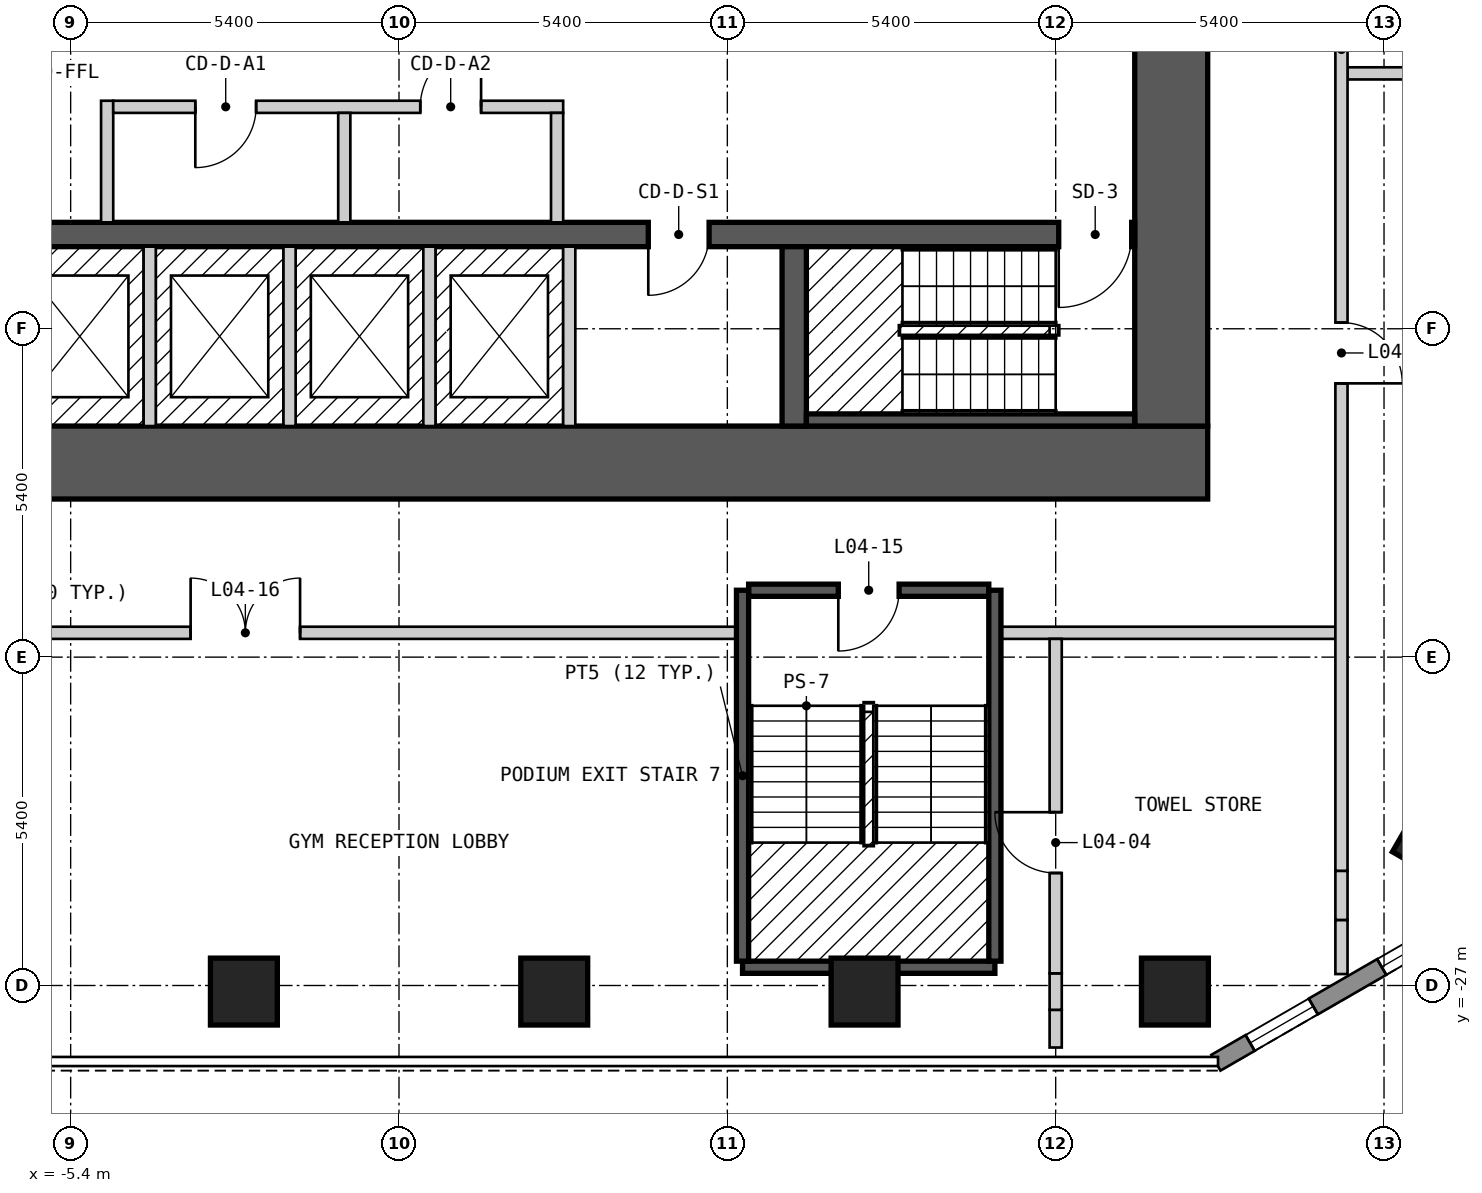
"""IFC4 building model, lengths in metres.
Left out: names, types, materials, properties, quantities, classifications, styles, units other than length and angle.
Written with IfcOpenShell. Run it as: python <this file> out.ifc"""

import sys

from ifc_helpers import new_model, si_unit, direction, frame, frame_2d, origin, origin_2d, place, context, subcontext, project, spatial, polyline, rectangle, outline, extrude, element, fill, save


model = new_model("IFC4")
c1 = context("Model", 3, precision=1e-05, world=origin(), true_north=direction((0.0, 1.0)))
c2 = subcontext(c1, "Body", "Model", "MODEL_VIEW")
j1 = project(units=[si_unit("LENGTHUNIT", "METRE"), si_unit("PLANEANGLEUNIT", "RADIAN")], contexts=[c1])
p1 = place(None, origin())
s1 = spatial("IfcSite", under=j1, at=p1, CompositionType="ELEMENT")
p2 = place(p1, origin())
s2 = spatial("IfcBuilding", under=s1, at=p2, CompositionType="ELEMENT")
p3 = place(p2, frame((0.0, 0.0, 16.2)))
s3 = spatial("IfcBuildingStorey", under=s2, at=p3, CompositionType="ELEMENT", Elevation=16.2)
for number, where, z_axis, x_axis in (
    (1, (-2.551, -27.1, 0.0), (0.0, 0.0, 1.0), (1.0, 0.0, 0.0)),
    (2, (2.553, -27.1, 0.0), (0.0, 0.0, 1.0), (1.0, 0.0, 0.0)),
    (3, (7.657, -27.1, 0.0), (0.0, 0.0, 1.0), (1.0, 0.0, 0.0)),
    (4, (12.761, -27.1, 0.0), (0.0, 0.0, 1.0), (1.0, 0.0, 0.0)),
    (5, (17.09, -24.6, 0.0), (0.0, 0.0, 1.0), (0.5, 0.866, 0.0)),
):
    element("IfcColumn", number, at=place(p3, frame(where, z_axis=z_axis, x_axis=x_axis)), inside=s3, PredefinedType="COLUMN", context=c2, shape_type="SweptSolid", body=[
        extrude(rectangle(XDim=1.1, YDim=1.1, at=origin_2d()), origin(), (0.0, 0.0, 1.0), 3.6),
    ])
p4 = place(p3, frame((-13.3, -18.4, 0.0), z_axis=(0.0, 0.0, 1.0), x_axis=(1.0, 0.0, 0.0)))
e6 = element("IfcWall", 6, at=p4, inside=s3, PredefinedType="SHEAR", context=c2, shape_type="SweptSolid", body=[
    extrude(rectangle(XDim=26.6, YDim=1.2, at=frame_2d((13.3, 0.0))), origin(), (0.0, 0.0, 1.0), 3.25),
])
p5 = place(p3, frame((12.7, -17.8, 0.0), z_axis=(0.0, 0.0, 1.0), x_axis=(0.0, 1.0, 0.0)))
e7 = element("IfcWall", 7, at=p5, inside=s3, PredefinedType="SHEAR", context=c2, shape_type="SweptSolid", body=[
    extrude(rectangle(XDim=11.6, YDim=1.2, at=frame_2d((5.8, 0.0))), origin(), (0.0, 0.0, 1.0), 3.25),
])
p6 = place(p3, frame((-12.1, -14.65, 0.0), z_axis=(0.0, 0.0, 1.0), x_axis=(1.0, 0.0, 0.0)))
e8 = element("IfcWall", 8, at=p6, inside=s3, PredefinedType="SHEAR", context=c2, shape_type="SweptSolid", body=[
    extrude(rectangle(XDim=24.2, YDim=0.4, at=frame_2d((12.1, 0.0))), origin(), (0.0, 0.0, 1.0), 3.25),
])
p7 = place(p6, frame((1.3, 0.0, 0.0), z_axis=(0.0, 0.0, 1.0), x_axis=(-1.0, 0.0, 0.0)))
e9 = element("IfcOpeningElement", 9, at=p7, cuts=e8, PredefinedType="OPENING", context=c2, shape_type="SweptSolid", body=[
    extrude(rectangle(XDim=1.2, YDim=2.1, at=frame_2d((0.6, 1.05))), frame((0.0, 0.21, 0.0), z_axis=(0.0, -1.0, 0.0), x_axis=(1.0, 0.0, 0.0)), (0.0, 0.0, 1.0), 0.42),
])
p8 = place(p6, frame((24.15, 0.0, 0.0), z_axis=(0.0, 0.0, 1.0), x_axis=(-1.0, 0.0, 0.0)))
e10 = element("IfcOpeningElement", 10, at=p8, cuts=e8, PredefinedType="OPENING", context=c2, shape_type="SweptSolid", body=[
    extrude(rectangle(XDim=1.2, YDim=2.1, at=frame_2d((0.6, 1.05))), frame((0.0, 0.21, 0.0), z_axis=(0.0, -1.0, 0.0), x_axis=(1.0, 0.0, 0.0)), (0.0, 0.0, 1.0), 0.42),
])
p9 = place(p6, frame((17.2, 0.0, 0.0), z_axis=(0.0, 0.0, 1.0), x_axis=(-1.0, 0.0, 0.0)))
e11 = element("IfcOpeningElement", 11, at=p9, cuts=e8, PredefinedType="OPENING", context=c2, shape_type="SweptSolid", body=[
    extrude(rectangle(XDim=1.0, YDim=2.1, at=frame_2d((0.5, 1.05))), frame((0.0, 0.21, 0.0), z_axis=(0.0, -1.0, 0.0), x_axis=(1.0, 0.0, 0.0)), (0.0, 0.0, 1.0), 0.42),
])
p10 = place(p3, frame((6.5, -17.8, 0.0), z_axis=(0.0, 0.0, 1.0), x_axis=(0.0, 1.0, 0.0)))
e12 = element("IfcWall", 12, at=p10, inside=s3, PredefinedType="SHEAR", context=c2, shape_type="SweptSolid", body=[
    extrude(rectangle(XDim=2.95, YDim=0.4, at=frame_2d((1.475, 0.0))), origin(), (0.0, 0.0, 1.0), 3.25),
])
p11 = place(p3, frame((13.435, -28.27, 0.0), z_axis=(0.0, 0.0, 1.0), x_axis=(0.866010750942, 0.50002537861, 0.0)))
e13 = element("IfcWall", 13, at=p11, inside=s3, PredefinedType="SOLIDWALL", context=c2, shape_type="SweptSolid", body=[
    extrude(outline(polyline([(0.0, -0.15), (5.0, -0.15), (4.919, 0.15), (0.08, 0.15), (0.0, -0.15)])), origin(), (0.0, 0.0, 1.0), 3.25),
])
p12 = place(p11, frame((0.65, 0.0, 0.15)))
e14 = element("IfcOpeningElement", 14, at=p12, cuts=e13, PredefinedType="OPENING", context=c2, shape_type="SweptSolid", body=[
    extrude(rectangle(XDim=1.2, YDim=2.1, at=frame_2d((0.6, 1.05))), frame((0.0, 0.16, 0.0), z_axis=(0.0, -1.0, 0.0), x_axis=(1.0, 0.0, 0.0)), (0.0, 0.0, 1.0), 0.32),
])
p13 = place(p11, frame((3.149, 0.0, 0.15)))
e15 = element("IfcOpeningElement", 15, at=p13, cuts=e13, PredefinedType="OPENING", context=c2, shape_type="SweptSolid", body=[
    extrude(rectangle(XDim=1.2, YDim=2.1, at=frame_2d((0.6, 1.05))), frame((0.0, 0.16, 0.0), z_axis=(0.0, -1.0, 0.0), x_axis=(1.0, 0.0, 0.0)), (0.0, 0.0, 1.0), 0.32),
])
p14 = place(p3, frame((5.65, -26.7, 0.0), z_axis=(0.0, 0.0, 1.0), x_axis=(1.0, 0.0, 0.0)))
e16 = element("IfcWall", 16, at=p14, inside=s3, PredefinedType="SOLIDWALL", context=c2, shape_type="SweptSolid", body=[
    extrude(rectangle(XDim=4.15, YDim=0.2, at=frame_2d((2.075, 0.0))), origin(), (0.0, 0.0, 1.0), 3.25),
])
p15 = place(p3, frame((-18.35, -21.2, 0.0), z_axis=(0.0, 0.0, 1.0), x_axis=(1.0, 0.0, 0.0)))
e17 = element("IfcWall", 17, at=p15, inside=s3, PredefinedType="PARTITIONING", context=c2, shape_type="SweptSolid", body=[
    extrude(rectangle(XDim=24.1, YDim=0.2, at=frame_2d((12.05, 0.0))), origin(), (0.0, 0.0, 1.0), 3.25),
])
p16 = place(p15, frame((2.277, 0.0, 0.0), z_axis=(0.0, 0.0, 1.0), x_axis=(-1.0, 0.0, 0.0)))
e18 = element("IfcOpeningElement", 18, at=p16, cuts=e17, PredefinedType="OPENING", context=c2, shape_type="SweptSolid", body=[
    extrude(rectangle(XDim=0.9, YDim=2.1, at=frame_2d((0.45, 1.05))), frame((0.0, 0.11, 0.0), z_axis=(0.0, -1.0, 0.0), x_axis=(1.0, 0.0, 0.0)), (0.0, 0.0, 1.0), 0.22),
])
p17 = place(p15, frame((6.15, 0.0, 0.0), z_axis=(0.0, 0.0, 1.0), x_axis=(-1.0, 0.0, 0.0)))
e19 = element("IfcOpeningElement", 19, at=p17, cuts=e17, PredefinedType="OPENING", context=c2, shape_type="SweptSolid", body=[
    extrude(rectangle(XDim=1.0, YDim=2.1, at=frame_2d((0.5, 1.05))), frame((0.0, 0.11, 0.0), z_axis=(0.0, -1.0, 0.0), x_axis=(1.0, 0.0, 0.0)), (0.0, 0.0, 1.0), 0.22),
])
p18 = place(p15, frame((14.923, 0.0, 0.0)))
e20 = element("IfcOpeningElement", 20, at=p18, cuts=e17, PredefinedType="OPENING", context=c2, shape_type="SweptSolid", body=[
    extrude(rectangle(XDim=1.8, YDim=2.1, at=frame_2d((0.9, 1.05))), frame((0.0, 0.11, 0.0), z_axis=(0.0, -1.0, 0.0), x_axis=(1.0, 0.0, 0.0)), (0.0, 0.0, 1.0), 0.22),
])
p19 = place(p3, frame((9.7, -21.2, 0.0), z_axis=(0.0, 0.0, 1.0), x_axis=(1.0, 0.0, 0.0)))
e21 = element("IfcWall", 21, at=p19, inside=s3, PredefinedType="PARTITIONING", context=c2, shape_type="SweptSolid", body=[
    extrude(rectangle(XDim=5.7, YDim=0.2, at=frame_2d((2.85, 0.0))), origin(), (0.0, 0.0, 1.0), 3.25),
])
p20 = place(p3, frame((5.75, -20.5, 0.0), z_axis=(0.0, 0.0, 1.0), x_axis=(1.0, 0.0, 0.0)))
e22 = element("IfcWall", 22, at=p20, inside=s3, PredefinedType="SOLIDWALL", context=c2, shape_type="SweptSolid", body=[
    extrude(rectangle(XDim=3.95, YDim=0.2, at=frame_2d((1.975, 0.0))), origin(), (0.0, 0.0, 1.0), 3.25),
])
p21 = place(p20, frame((2.475, 0.0, 0.0), z_axis=(0.0, 0.0, 1.0), x_axis=(-1.0, 0.0, 0.0)))
e23 = element("IfcOpeningElement", 23, at=p21, cuts=e22, PredefinedType="OPENING", context=c2, shape_type="SweptSolid", body=[
    extrude(rectangle(XDim=1.0, YDim=2.1, at=frame_2d((0.5, 1.05))), frame((0.0, 0.11, 0.0), z_axis=(0.0, -1.0, 0.0), x_axis=(1.0, 0.0, 0.0)), (0.0, 0.0, 1.0), 0.22),
])
p22 = place(p3, frame((15.6, -12.0, 0.0), z_axis=(0.0, 0.0, 1.0), x_axis=(1.0, 0.0, 0.0)))
e24 = element("IfcWall", 24, at=p22, inside=s3, PredefinedType="PARTITIONING", context=c2, shape_type="SweptSolid", body=[
    extrude(rectangle(XDim=8.36, YDim=0.2, at=frame_2d((4.18, 0.0))), origin(), (0.0, 0.0, 1.0), 3.25),
])
for number, where, z_axis, x_axis in (
    (25, (5.65, -26.6, 0.0), (0.0, 0.0, 1.0), (0.0, 1.0, 0.0)),
    (26, (9.8, -26.6, 0.0), (0.0, 0.0, 1.0), (0.0, 1.0, 0.0)),
):
    element("IfcWall", number, at=place(p3, frame(where, z_axis=z_axis, x_axis=x_axis)), inside=s3, PredefinedType="SOLIDWALL", context=c2, shape_type="SweptSolid", body=[
        extrude(rectangle(XDim=6.1, YDim=0.2, at=frame_2d((3.05, 0.0))), origin(), (0.0, 0.0, 1.0), 3.25),
    ])
p23 = place(p3, frame((10.8, -28.02, 0.0), z_axis=(0.0, 0.0, 1.0), x_axis=(0.0, 1.0, 0.0)))
e27 = element("IfcWall", 27, at=p23, inside=s3, PredefinedType="PARTITIONING", context=c2, shape_type="SweptSolid", body=[
    extrude(rectangle(XDim=0.62, YDim=0.2, at=frame_2d((0.31, 0.0))), origin(), (0.0, 0.0, 1.0), 3.25),
])
p24 = place(p3, frame((10.8, -27.4, 0.0), z_axis=(0.0, 0.0, 1.0), x_axis=(0.0, 1.0, 0.0)))
e28 = element("IfcWall", 28, at=p24, inside=s3, PredefinedType="PARTITIONING", context=c2, shape_type="SweptSolid", body=[
    extrude(rectangle(XDim=0.6, YDim=0.2, at=frame_2d((0.3, 0.0))), origin(), (0.0, 0.0, 1.0), 2.52),
])
p25 = place(p3, frame((10.8, -26.8, 0.0), z_axis=(0.0, 0.0, 1.0), x_axis=(0.0, 1.0, 0.0)))
e29 = element("IfcWall", 29, at=p25, inside=s3, PredefinedType="PARTITIONING", context=c2, shape_type="SweptSolid", body=[
    extrude(rectangle(XDim=5.5, YDim=0.2, at=frame_2d((2.75, 0.0))), origin(), (0.0, 0.0, 1.0), 3.25),
])
p26 = place(p25, frame((2.65, 0.0, 0.0), z_axis=(0.0, 0.0, 1.0), x_axis=(-1.0, 0.0, 0.0)))
e30 = element("IfcOpeningElement", 30, at=p26, cuts=e29, PredefinedType="OPENING", context=c2, shape_type="SweptSolid", body=[
    extrude(rectangle(XDim=1.0, YDim=2.1, at=frame_2d((0.5, 1.05))), frame((0.0, 0.11, 0.0), z_axis=(0.0, -1.0, 0.0), x_axis=(1.0, 0.0, 0.0)), (0.0, 0.0, 1.0), 0.22),
])
p27 = place(p3, frame((15.5, -26.812, 0.0), z_axis=(0.0, 0.0, 1.0), x_axis=(0.0, 1.0, 0.0)))
e31 = element("IfcWall", 31, at=p27, inside=s3, PredefinedType="PARTITIONING", context=c2, shape_type="SweptSolid", body=[
    extrude(rectangle(XDim=0.89, YDim=0.2, at=frame_2d((0.445, 0.0))), origin(), (0.0, 0.0, 1.0), 3.25),
])
p28 = place(p3, frame((15.5, -25.922, 0.0), z_axis=(0.0, 0.0, 1.0), x_axis=(0.0, 1.0, 0.0)))
e32 = element("IfcWall", 32, at=p28, inside=s3, PredefinedType="PARTITIONING", context=c2, shape_type="SweptSolid", body=[
    extrude(rectangle(XDim=0.808, YDim=0.2, at=frame_2d((0.404, 0.0))), origin(), (0.0, 0.0, 1.0), 2.52),
])
p29 = place(p3, frame((15.5, -25.114, 0.0), z_axis=(0.0, 0.0, 1.0), x_axis=(0.0, 1.0, 0.0)))
e33 = element("IfcWall", 33, at=p29, inside=s3, PredefinedType="PARTITIONING", context=c2, shape_type="SweptSolid", body=[
    extrude(rectangle(XDim=27.014, YDim=0.2, at=frame_2d((13.507, 0.0))), origin(), (0.0, 0.0, 1.0), 3.25),
])
p30 = place(p29, frame((9.016, 0.0, 0.0), z_axis=(0.0, 0.0, 1.0), x_axis=(-1.0, 0.0, 0.0)))
e34 = element("IfcOpeningElement", 34, at=p30, cuts=e33, PredefinedType="OPENING", context=c2, shape_type="SweptSolid", body=[
    extrude(rectangle(XDim=1.0, YDim=2.1, at=frame_2d((0.5, 1.05))), frame((0.0, 0.11, 0.0), z_axis=(0.0, -1.0, 0.0), x_axis=(1.0, 0.0, 0.0)), (0.0, 0.0, 1.0), 0.22),
])
p31 = place(p29, frame((21.012, 0.0, 0.0), z_axis=(0.0, 0.0, 1.0), x_axis=(-1.0, 0.0, 0.0)))
e35 = element("IfcOpeningElement", 35, at=p31, cuts=e33, PredefinedType="OPENING", context=c2, shape_type="SweptSolid", body=[
    extrude(rectangle(XDim=1.8, YDim=2.1, at=frame_2d((0.9, 1.05))), frame((0.0, 0.11, 0.0), z_axis=(0.0, -1.0, 0.0), x_axis=(1.0, 0.0, 0.0)), (0.0, 0.0, 1.0), 0.22),
])
p32 = place(p3, frame((-4.8, -14.45, 0.0), z_axis=(0.0, 0.0, 1.0), x_axis=(0.0, 1.0, 0.0)))
e36 = element("IfcWall", 36, at=p32, inside=s3, PredefinedType="PARTITIONING", context=c2, shape_type="SweptSolid", body=[
    extrude(rectangle(XDim=2.0, YDim=0.2, at=frame_2d((1.0, 0.0))), origin(), (0.0, 0.0, 1.0), 3.25),
])
p33 = place(p3, frame((-4.7, -12.55, 0.0), z_axis=(0.0, 0.0, 1.0), x_axis=(1.0, 0.0, 0.0)))
e37 = element("IfcWall", 37, at=p33, inside=s3, PredefinedType="PARTITIONING", context=c2, shape_type="SweptSolid", body=[
    extrude(rectangle(XDim=7.4, YDim=0.2, at=frame_2d((3.7, 0.0))), origin(), (0.0, 0.0, 1.0), 3.25),
])
p34 = place(p33, frame((2.35, 0.0, 0.0), z_axis=(0.0, 0.0, 1.0), x_axis=(-1.0, 0.0, 0.0)))
e38 = element("IfcOpeningElement", 38, at=p34, cuts=e37, PredefinedType="OPENING", context=c2, shape_type="SweptSolid", body=[
    extrude(rectangle(XDim=1.0, YDim=2.1, at=frame_2d((0.5, 1.05))), frame((0.0, 0.11, 0.0), z_axis=(0.0, -1.0, 0.0), x_axis=(1.0, 0.0, 0.0)), (0.0, 0.0, 1.0), 0.22),
])
p35 = place(p33, frame((6.05, 0.0, 0.0), z_axis=(0.0, 0.0, 1.0), x_axis=(-1.0, 0.0, 0.0)))
e39 = element("IfcOpeningElement", 39, at=p35, cuts=e37, PredefinedType="OPENING", context=c2, shape_type="SweptSolid", body=[
    extrude(rectangle(XDim=1.0, YDim=2.1, at=frame_2d((0.5, 1.05))), frame((0.0, 0.11, 0.0), z_axis=(0.0, -1.0, 0.0), x_axis=(1.0, 0.0, 0.0)), (0.0, 0.0, 1.0), 0.22),
])
for number, where, z_axis, x_axis in (
    (40, (-4.1, -17.8, 0.0), (0.0, 0.0, 1.0), (0.0, 1.0, 0.0)),
    (41, (-1.8, -17.8, 0.0), (0.0, 0.0, 1.0), (0.0, 1.0, 0.0)),
):
    element("IfcWall", number, at=place(p3, frame(where, z_axis=z_axis, x_axis=x_axis)), inside=s3, PredefinedType="SOLIDWALL", context=c2, shape_type="SweptSolid", body=[
        extrude(rectangle(XDim=2.95, YDim=0.2, at=frame_2d((1.475, 0.0))), origin(), (0.0, 0.0, 1.0), 3.25),
    ])
p36 = place(p3, frame((-0.9, -14.45, 0.0), z_axis=(0.0, 0.0, 1.0), x_axis=(0.0, 1.0, 0.0)))
e42 = element("IfcWall", 42, at=p36, inside=s3, PredefinedType="PARTITIONING", context=c2, shape_type="SweptSolid", body=[
    extrude(rectangle(XDim=1.8, YDim=0.2, at=frame_2d((0.9, 0.0))), origin(), (0.0, 0.0, 1.0), 3.25),
])
p37 = place(p3, frame((0.5, -17.8, 0.0), z_axis=(0.0, 0.0, 1.0), x_axis=(0.0, 1.0, 0.0)))
e43 = element("IfcWall", 43, at=p37, inside=s3, PredefinedType="SOLIDWALL", context=c2, shape_type="SweptSolid", body=[
    extrude(rectangle(XDim=2.95, YDim=0.2, at=frame_2d((1.475, 0.0))), origin(), (0.0, 0.0, 1.0), 3.25),
])
p38 = place(p3, frame((2.6, -14.45, 0.0), z_axis=(0.0, 0.0, 1.0), x_axis=(0.0, 1.0, 0.0)))
e44 = element("IfcWall", 44, at=p38, inside=s3, PredefinedType="PARTITIONING", context=c2, shape_type="SweptSolid", body=[
    extrude(rectangle(XDim=1.8, YDim=0.2, at=frame_2d((0.9, 0.0))), origin(), (0.0, 0.0, 1.0), 3.25),
])
p39 = place(p3, frame((2.8, -17.8, 0.0), z_axis=(0.0, 0.0, 1.0), x_axis=(0.0, 1.0, 0.0)))
e45 = element("IfcWall", 45, at=p39, inside=s3, PredefinedType="SOLIDWALL", context=c2, shape_type="SweptSolid", body=[
    extrude(rectangle(XDim=2.95, YDim=0.2, at=frame_2d((1.475, 0.0))), origin(), (0.0, 0.0, 1.0), 3.25),
])
p40 = place(p3, frame((6.7, -17.7, 0.0), z_axis=(0.0, 0.0, 1.0), x_axis=(1.0, 0.0, 0.0)))
e46 = element("IfcWall", 46, at=p40, inside=s3, PredefinedType="SOLIDWALL", context=c2, shape_type="SweptSolid", body=[
    extrude(rectangle(XDim=5.4, YDim=0.2, at=frame_2d((2.7, 0.0))), origin(), (0.0, 0.0, 1.0), 3.25),
])
p41 = place(p12, origin())
e47 = element("IfcWindow", 47, at=p41, inside=s3, PartitioningType="SINGLE_PANEL", PredefinedType="WINDOW", context=c2, shape_type="SweptSolid", body=[
    extrude(rectangle(XDim=1.2, YDim=2.1, at=frame_2d((0.6, 1.05))), frame((0.0, 0.03, 0.0), z_axis=(0.0, -1.0, 0.0), x_axis=(1.0, 0.0, 0.0)), (0.0, 0.0, 1.0), 0.06),
])
fill(e14, e47)
p42 = place(p13, origin())
e48 = element("IfcWindow", 48, at=p42, inside=s3, PartitioningType="SINGLE_PANEL", PredefinedType="WINDOW", context=c2, shape_type="SweptSolid", body=[
    extrude(rectangle(XDim=1.2, YDim=2.1, at=frame_2d((0.6, 1.05))), frame((0.0, 0.03, 0.0), z_axis=(0.0, -1.0, 0.0), x_axis=(1.0, 0.0, 0.0)), (0.0, 0.0, 1.0), 0.06),
])
fill(e15, e48)
p43 = place(p26, origin())
e49 = element("IfcDoor", 49, at=p43, inside=s3, OperationType="SINGLE_SWING_LEFT", PredefinedType="DOOR", context=c2, shape_type="SweptSolid", body=[
    extrude(rectangle(XDim=1.0, YDim=2.1, at=frame_2d((0.5, 1.05))), frame((0.0, 0.025, 0.0), z_axis=(0.0, -1.0, 0.0), x_axis=(1.0, 0.0, 0.0)), (0.0, 0.0, 1.0), 0.05),
])
fill(e30, e49)
p44 = place(p30, origin())
e50 = element("IfcDoor", 50, at=p44, inside=s3, OperationType="SINGLE_SWING_RIGHT", PredefinedType="DOOR", context=c2, shape_type="SweptSolid", body=[
    extrude(rectangle(XDim=1.0, YDim=2.1, at=frame_2d((0.5, 1.05))), frame((0.0, 0.025, 0.0), z_axis=(0.0, -1.0, 0.0), x_axis=(1.0, 0.0, 0.0)), (0.0, 0.0, 1.0), 0.05),
])
fill(e34, e50)
p45 = place(p21, origin())
e51 = element("IfcDoor", 51, at=p45, inside=s3, OperationType="SINGLE_SWING_RIGHT", PredefinedType="DOOR", context=c2, shape_type="SweptSolid", body=[
    extrude(rectangle(XDim=1.0, YDim=2.1, at=frame_2d((0.5, 1.05))), frame((0.0, 0.025, 0.0), z_axis=(0.0, -1.0, 0.0), x_axis=(1.0, 0.0, 0.0)), (0.0, 0.0, 1.0), 0.05),
])
fill(e23, e51)
p46 = place(p18, origin())
e52 = element("IfcDoor", 52, at=p46, inside=s3, OperationType="DOUBLE_DOOR_SINGLE_SWING", PredefinedType="DOOR", context=c2, shape_type="SweptSolid", body=[
    extrude(rectangle(XDim=1.8, YDim=2.1, at=frame_2d((0.9, 1.05))), frame((0.0, 0.025, 0.0), z_axis=(0.0, -1.0, 0.0), x_axis=(1.0, 0.0, 0.0)), (0.0, 0.0, 1.0), 0.05),
])
fill(e20, e52)
p47 = place(p8, origin())
e53 = element("IfcDoor", 53, at=p47, inside=s3, OperationType="SINGLE_SWING_RIGHT", PredefinedType="DOOR", context=c2, shape_type="SweptSolid", body=[
    extrude(rectangle(XDim=1.2, YDim=2.1, at=frame_2d((0.6, 1.05))), frame((0.0, 0.025, 0.0), z_axis=(0.0, -1.0, 0.0), x_axis=(1.0, 0.0, 0.0)), (0.0, 0.0, 1.0), 0.05),
])
fill(e10, e53)
p48 = place(p34, origin())
e54 = element("IfcDoor", 54, at=p48, inside=s3, OperationType="SINGLE_SWING_RIGHT", PredefinedType="DOOR", context=c2, shape_type="SweptSolid", body=[
    extrude(rectangle(XDim=1.0, YDim=2.1, at=frame_2d((0.5, 1.05))), frame((0.0, 0.025, 0.0), z_axis=(0.0, -1.0, 0.0), x_axis=(1.0, 0.0, 0.0)), (0.0, 0.0, 1.0), 0.05),
])
fill(e38, e54)
p49 = place(p35, origin())
e55 = element("IfcDoor", 55, at=p49, inside=s3, OperationType="SINGLE_SWING_LEFT", PredefinedType="DOOR", context=c2, shape_type="SweptSolid", body=[
    extrude(rectangle(XDim=1.0, YDim=2.1, at=frame_2d((0.5, 1.05))), frame((0.0, 0.025, 0.0), z_axis=(0.0, -1.0, 0.0), x_axis=(1.0, 0.0, 0.0)), (0.0, 0.0, 1.0), 0.05),
])
fill(e39, e55)
p50 = place(p9, origin())
e56 = element("IfcDoor", 56, at=p50, inside=s3, OperationType="SINGLE_SWING_RIGHT", PredefinedType="DOOR", context=c2, shape_type="SweptSolid", body=[
    extrude(rectangle(XDim=1.0, YDim=2.1, at=frame_2d((0.5, 1.05))), frame((0.0, 0.025, 0.0), z_axis=(0.0, -1.0, 0.0), x_axis=(1.0, 0.0, 0.0)), (0.0, 0.0, 1.0), 0.05),
])
fill(e11, e56)
save(model, sys.argv[1])
